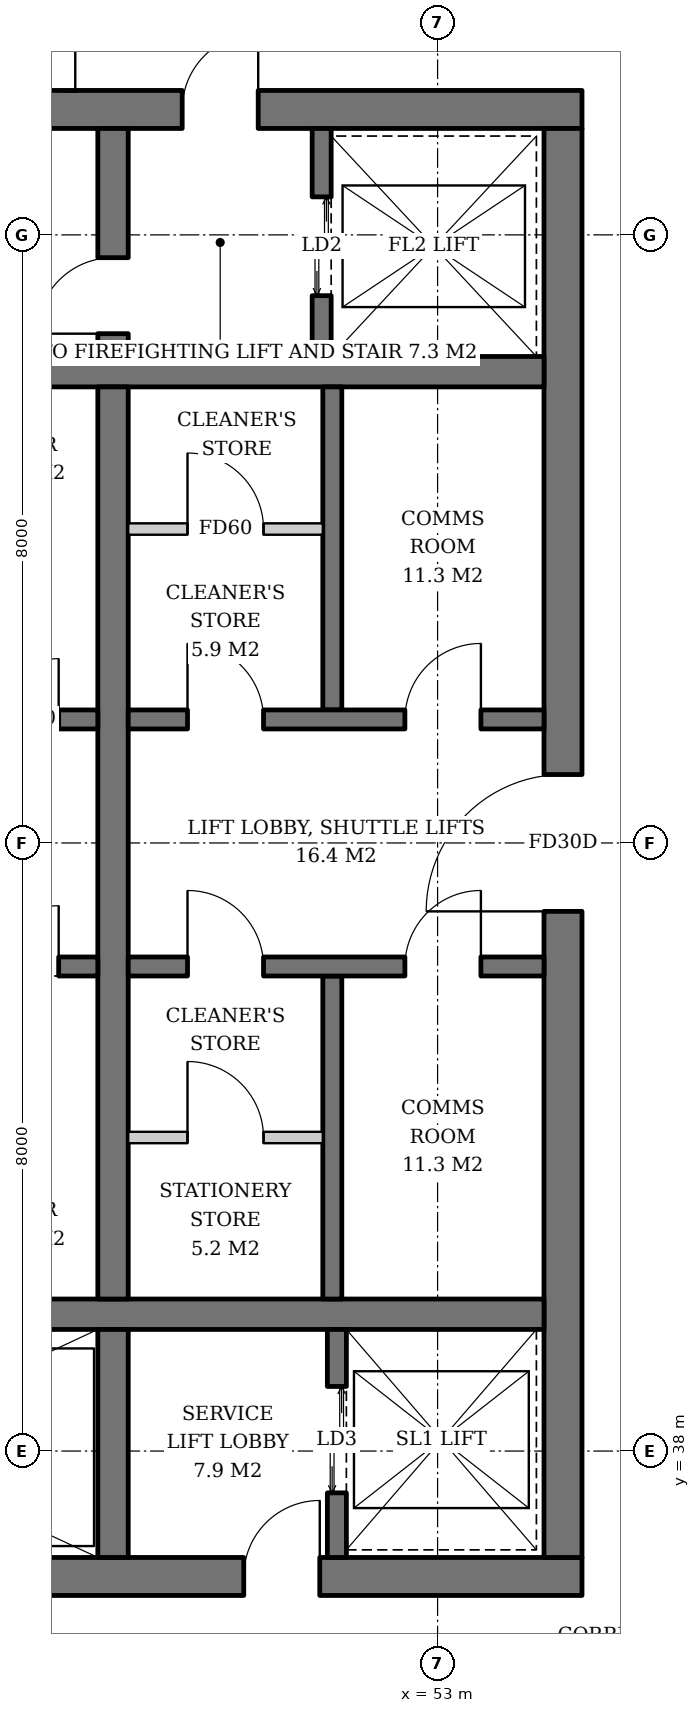
"""IFC4 building model, lengths in metres.
Left out: names, types, materials, properties, quantities, classifications, styles, units other than length and angle.
Written with IfcOpenShell. Run it as: python <this file> out.ifc"""

import sys

from ifc_helpers import new_model, si_unit, direction, frame, frame_2d, origin, place, context, subcontext, project, spatial, rectangle, extrude, element, fill, save


model = new_model("IFC4")
c1 = context("Model", 3, precision=1e-05, world=origin(), true_north=direction((0.0, 1.0)))
c2 = subcontext(c1, "Body", "Model", "MODEL_VIEW")
j1 = project(units=[si_unit("LENGTHUNIT", "METRE"), si_unit("PLANEANGLEUNIT", "RADIAN")], contexts=[c1])
p1 = place(None, origin())
s1 = spatial("IfcSite", under=j1, at=p1, CompositionType="ELEMENT")
p2 = place(p1, origin())
s2 = spatial("IfcBuilding", under=s1, at=p2, CompositionType="ELEMENT")
p3 = place(p2, frame((0.0, 0.0, 264.2)))
s3 = spatial("IfcBuildingStorey", under=s2, at=p3, CompositionType="ELEMENT", Elevation=264.2)
p4 = place(p3, frame((35.1, 36.35, 0.0), z_axis=(0.0, 0.0, 1.0), x_axis=(1.0, 0.0, 0.0)))
e1 = element("IfcWall", 1, at=p4, inside=s3, PredefinedType="SHEAR", context=c2, shape_type="SweptSolid", body=[
    extrude(rectangle(XDim=19.8, YDim=0.5, at=frame_2d((9.9, 0.0))), origin(), (0.0, 0.0, 1.0), 3.8),
])
p5 = place(p4, frame((3.9, 0.0, 0.0)))
e2 = element("IfcOpeningElement", 2, at=p5, cuts=e1, PredefinedType="OPENING", context=c2, shape_type="SweptSolid", body=[
    extrude(rectangle(XDim=1.0, YDim=2.1, at=frame_2d((0.5, 1.05))), frame((0.0, 0.26, 0.0), z_axis=(0.0, -1.0, 0.0), x_axis=(1.0, 0.0, 0.0)), (0.0, 0.0, 1.0), 0.52),
])
p6 = place(p4, frame((15.35, 0.0, 0.0)))
e3 = element("IfcOpeningElement", 3, at=p6, cuts=e1, PredefinedType="OPENING", context=c2, shape_type="SweptSolid", body=[
    extrude(rectangle(XDim=1.0, YDim=2.1, at=frame_2d((0.5, 1.05))), frame((0.0, 0.26, 0.0), z_axis=(0.0, -1.0, 0.0), x_axis=(1.0, 0.0, 0.0)), (0.0, 0.0, 1.0), 0.52),
])
p7 = place(p3, frame((35.1, 55.65, 0.0), z_axis=(0.0, 0.0, 1.0), x_axis=(1.0, 0.0, 0.0)))
e4 = element("IfcWall", 4, at=p7, inside=s3, PredefinedType="SHEAR", context=c2, shape_type="SweptSolid", body=[
    extrude(rectangle(XDim=19.8, YDim=0.5, at=frame_2d((9.9, 0.0))), origin(), (0.0, 0.0, 1.0), 3.8),
])
p8 = place(p7, frame((14.54, 0.0, 0.0)))
e5 = element("IfcOpeningElement", 5, at=p8, cuts=e4, PredefinedType="OPENING", context=c2, shape_type="SweptSolid", body=[
    extrude(rectangle(XDim=1.0, YDim=2.1, at=frame_2d((0.5, 1.05))), frame((0.0, 0.26, 0.0), z_axis=(0.0, -1.0, 0.0), x_axis=(1.0, 0.0, 0.0)), (0.0, 0.0, 1.0), 0.52),
])
p9 = place(p7, frame((0.77, 0.0, 0.0)))
e6 = element("IfcOpeningElement", 6, at=p9, cuts=e4, PredefinedType="OPENING", context=c2, shape_type="SweptSolid", body=[
    extrude(rectangle(XDim=1.0, YDim=2.1, at=frame_2d((0.5, 1.05))), frame((0.0, 0.26, 0.0), z_axis=(0.0, -1.0, 0.0), x_axis=(1.0, 0.0, 0.0)), (0.0, 0.0, 1.0), 0.52),
])
p10 = place(p7, frame((2.28, 0.0, 0.0)))
e7 = element("IfcOpeningElement", 7, at=p10, cuts=e4, PredefinedType="OPENING", context=c2, shape_type="SweptSolid", body=[
    extrude(rectangle(XDim=1.0, YDim=2.1, at=frame_2d((0.5, 1.05))), frame((0.0, 0.26, 0.0), z_axis=(0.0, -1.0, 0.0), x_axis=(1.0, 0.0, 0.0)), (0.0, 0.0, 1.0), 0.52),
])
p11 = place(p7, frame((3.895, 0.0, 0.0)))
e8 = element("IfcOpeningElement", 8, at=p11, cuts=e4, PredefinedType="OPENING", context=c2, shape_type="SweptSolid", body=[
    extrude(rectangle(XDim=1.0, YDim=2.1, at=frame_2d((0.5, 1.05))), frame((0.0, 0.26, 0.0), z_axis=(0.0, -1.0, 0.0), x_axis=(1.0, 0.0, 0.0)), (0.0, 0.0, 1.0), 0.52),
])
p12 = place(p3, frame((54.65, 36.6, 0.0), z_axis=(0.0, 0.0, 1.0), x_axis=(0.0, 1.0, 0.0)))
e9 = element("IfcWall", 9, at=p12, inside=s3, PredefinedType="SHEAR", context=c2, shape_type="SweptSolid", body=[
    extrude(rectangle(XDim=18.8, YDim=0.5, at=frame_2d((9.4, 0.0))), origin(), (0.0, 0.0, 1.0), 3.8),
])
p13 = place(p12, frame((8.5, 0.0, 0.0)))
e10 = element("IfcOpeningElement", 10, at=p13, cuts=e9, PredefinedType="OPENING", context=c2, shape_type="SweptSolid", body=[
    extrude(rectangle(XDim=1.8, YDim=2.4, at=frame_2d((0.9, 1.2))), frame((0.0, 0.26, 0.0), z_axis=(0.0, -1.0, 0.0), x_axis=(1.0, 0.0, 0.0)), (0.0, 0.0, 1.0), 0.52),
])
for number, where, z_axis, x_axis in (
    (11, (35.6, 39.8, 0.0), (0.0, 0.0, 1.0), (1.0, 0.0, 0.0)),
    (12, (35.6, 52.2, 0.0), (0.0, 0.0, 1.0), (1.0, 0.0, 0.0)),
):
    element("IfcWall", number, at=place(p3, frame(where, z_axis=z_axis, x_axis=x_axis)), inside=s3, PredefinedType="SHEAR", context=c2, shape_type="SweptSolid", body=[
        extrude(rectangle(XDim=18.8, YDim=0.4, at=frame_2d((9.4, 0.0))), origin(), (0.0, 0.0, 1.0), 3.8),
    ])
p14 = place(p3, frame((48.73, 36.6, 0.0), z_axis=(0.0, 0.0, 1.0), x_axis=(0.0, 1.0, 0.0)))
e13 = element("IfcWall", 13, at=p14, inside=s3, PredefinedType="SHEAR", context=c2, shape_type="SweptSolid", body=[
    extrude(rectangle(XDim=3.0, YDim=0.4, at=frame_2d((1.5, 0.0))), origin(), (0.0, 0.0, 1.0), 3.8),
])
p15 = place(p3, frame((48.73, 40.0, 0.0), z_axis=(0.0, 0.0, 1.0), x_axis=(0.0, 1.0, 0.0)))
e14 = element("IfcWall", 14, at=p15, inside=s3, PredefinedType="SHEAR", context=c2, shape_type="SweptSolid", body=[
    extrude(rectangle(XDim=12.0, YDim=0.4, at=frame_2d((6.0, 0.0))), origin(), (0.0, 0.0, 1.0), 3.8),
])
p16 = place(p3, frame((48.73, 52.4, 0.0), z_axis=(0.0, 0.0, 1.0), x_axis=(0.0, 1.0, 0.0)))
e15 = element("IfcWall", 15, at=p16, inside=s3, PredefinedType="SHEAR", context=c2, shape_type="SweptSolid", body=[
    extrude(rectangle(XDim=3.0, YDim=0.4, at=frame_2d((1.5, 0.0))), origin(), (0.0, 0.0, 1.0), 3.8),
])
p17 = place(p16, frame((0.3, 0.0, 0.0)))
e16 = element("IfcOpeningElement", 16, at=p17, cuts=e15, PredefinedType="OPENING", context=c2, shape_type="SweptSolid", body=[
    extrude(rectangle(XDim=1.0, YDim=2.1, at=frame_2d((0.5, 1.05))), frame((0.0, 0.21, 0.0), z_axis=(0.0, -1.0, 0.0), x_axis=(1.0, 0.0, 0.0)), (0.0, 0.0, 1.0), 0.42),
])
p18 = place(p3, frame((51.675, 36.6, 0.0), z_axis=(0.0, 0.0, 1.0), x_axis=(0.0, 1.0, 0.0)))
e17 = element("IfcWall", 17, at=p18, inside=s3, PredefinedType="SHEAR", context=c2, shape_type="SweptSolid", body=[
    extrude(rectangle(XDim=3.0, YDim=0.25, at=frame_2d((1.5, 0.0))), origin(), (0.0, 0.0, 1.0), 3.8),
])
p19 = place(p18, frame((0.85, 0.0, 0.0)))
e18 = element("IfcOpeningElement", 18, at=p19, cuts=e17, PredefinedType="OPENING", context=c2, shape_type="SweptSolid", body=[
    extrude(rectangle(XDim=1.4, YDim=2.4, at=frame_2d((0.7, 1.2))), frame((0.0, 0.135, 0.0), z_axis=(0.0, -1.0, 0.0), x_axis=(1.0, 0.0, 0.0)), (0.0, 0.0, 1.0), 0.27),
])
p20 = place(p3, frame((51.475, 52.4, 0.0), z_axis=(0.0, 0.0, 1.0), x_axis=(0.0, 1.0, 0.0)))
e19 = element("IfcWall", 19, at=p20, inside=s3, PredefinedType="SHEAR", context=c2, shape_type="SweptSolid", body=[
    extrude(rectangle(XDim=3.0, YDim=0.25, at=frame_2d((1.5, 0.0))), origin(), (0.0, 0.0, 1.0), 3.8),
])
p21 = place(p20, frame((0.8, 0.0, 0.0)))
e20 = element("IfcOpeningElement", 20, at=p21, cuts=e19, PredefinedType="OPENING", context=c2, shape_type="SweptSolid", body=[
    extrude(rectangle(XDim=1.3, YDim=2.2, at=frame_2d((0.65, 1.1))), frame((0.0, 0.135, 0.0), z_axis=(0.0, -1.0, 0.0), x_axis=(1.0, 0.0, 0.0)), (0.0, 0.0, 1.0), 0.27),
])
p22 = place(p3, frame((35.6, 47.625, 0.0), z_axis=(0.0, 0.0, 1.0), x_axis=(1.0, 0.0, 0.0)))
e21 = element("IfcWall", 21, at=p22, inside=s3, PredefinedType="SHEAR", context=c2, shape_type="SweptSolid", body=[
    extrude(rectangle(XDim=12.93, YDim=0.25, at=frame_2d((6.465, 0.0))), origin(), (0.0, 0.0, 1.0), 3.8),
])
p23 = place(p22, frame((0.75, 0.0, 0.0)))
e22 = element("IfcOpeningElement", 22, at=p23, cuts=e21, PredefinedType="OPENING", context=c2, shape_type="SweptSolid", body=[
    extrude(rectangle(XDim=1.1, YDim=2.2, at=frame_2d((0.55, 1.1))), frame((0.0, 0.135, 0.0), z_axis=(0.0, -1.0, 0.0), x_axis=(1.0, 0.0, 0.0)), (0.0, 0.0, 1.0), 0.27),
])
p24 = place(p22, frame((3.55, 0.0, 0.0)))
e23 = element("IfcOpeningElement", 23, at=p24, cuts=e21, PredefinedType="OPENING", context=c2, shape_type="SweptSolid", body=[
    extrude(rectangle(XDim=1.1, YDim=2.2, at=frame_2d((0.55, 1.1))), frame((0.0, 0.135, 0.0), z_axis=(0.0, -1.0, 0.0), x_axis=(1.0, 0.0, 0.0)), (0.0, 0.0, 1.0), 0.27),
])
p25 = place(p22, frame((6.3, 0.0, 0.0)))
e24 = element("IfcOpeningElement", 24, at=p25, cuts=e21, PredefinedType="OPENING", context=c2, shape_type="SweptSolid", body=[
    extrude(rectangle(XDim=1.1, YDim=2.2, at=frame_2d((0.55, 1.1))), frame((0.0, 0.135, 0.0), z_axis=(0.0, -1.0, 0.0), x_axis=(1.0, 0.0, 0.0)), (0.0, 0.0, 1.0), 0.27),
])
p26 = place(p22, frame((9.1, 0.0, 0.0)))
e25 = element("IfcOpeningElement", 25, at=p26, cuts=e21, PredefinedType="OPENING", context=c2, shape_type="SweptSolid", body=[
    extrude(rectangle(XDim=1.0, YDim=2.1, at=frame_2d((0.5, 1.05))), frame((0.0, 0.135, 0.0), z_axis=(0.0, -1.0, 0.0), x_axis=(1.0, 0.0, 0.0)), (0.0, 0.0, 1.0), 0.27),
])
p27 = place(p22, frame((11.615, 0.0, 0.0)))
e26 = element("IfcOpeningElement", 26, at=p27, cuts=e21, PredefinedType="OPENING", context=c2, shape_type="SweptSolid", body=[
    extrude(rectangle(XDim=0.8, YDim=2.0, at=frame_2d((0.4, 1.0))), frame((0.0, 0.135, 0.0), z_axis=(0.0, -1.0, 0.0), x_axis=(1.0, 0.0, 0.0)), (0.0, 0.0, 1.0), 0.27),
])
p28 = place(p3, frame((35.6, 44.375, 0.0), z_axis=(0.0, 0.0, 1.0), x_axis=(1.0, 0.0, 0.0)))
e27 = element("IfcWall", 27, at=p28, inside=s3, PredefinedType="SHEAR", context=c2, shape_type="SweptSolid", body=[
    extrude(rectangle(XDim=12.93, YDim=0.25, at=frame_2d((6.465, 0.0))), origin(), (0.0, 0.0, 1.0), 3.8),
])
p29 = place(p28, frame((0.75, 0.0, 0.0)))
e28 = element("IfcOpeningElement", 28, at=p29, cuts=e27, PredefinedType="OPENING", context=c2, shape_type="SweptSolid", body=[
    extrude(rectangle(XDim=1.1, YDim=2.2, at=frame_2d((0.55, 1.1))), frame((0.0, 0.135, 0.0), z_axis=(0.0, -1.0, 0.0), x_axis=(1.0, 0.0, 0.0)), (0.0, 0.0, 1.0), 0.27),
])
p30 = place(p28, frame((3.55, 0.0, 0.0)))
e29 = element("IfcOpeningElement", 29, at=p30, cuts=e27, PredefinedType="OPENING", context=c2, shape_type="SweptSolid", body=[
    extrude(rectangle(XDim=1.1, YDim=2.2, at=frame_2d((0.55, 1.1))), frame((0.0, 0.135, 0.0), z_axis=(0.0, -1.0, 0.0), x_axis=(1.0, 0.0, 0.0)), (0.0, 0.0, 1.0), 0.27),
])
p31 = place(p28, frame((6.3, 0.0, 0.0)))
e30 = element("IfcOpeningElement", 30, at=p31, cuts=e27, PredefinedType="OPENING", context=c2, shape_type="SweptSolid", body=[
    extrude(rectangle(XDim=1.1, YDim=2.2, at=frame_2d((0.55, 1.1))), frame((0.0, 0.135, 0.0), z_axis=(0.0, -1.0, 0.0), x_axis=(1.0, 0.0, 0.0)), (0.0, 0.0, 1.0), 0.27),
])
p32 = place(p28, frame((9.1, 0.0, 0.0)))
e31 = element("IfcOpeningElement", 31, at=p32, cuts=e27, PredefinedType="OPENING", context=c2, shape_type="SweptSolid", body=[
    extrude(rectangle(XDim=1.0, YDim=2.1, at=frame_2d((0.5, 1.05))), frame((0.0, 0.135, 0.0), z_axis=(0.0, -1.0, 0.0), x_axis=(1.0, 0.0, 0.0)), (0.0, 0.0, 1.0), 0.27),
])
p33 = place(p28, frame((11.615, 0.0, 0.0)))
e32 = element("IfcOpeningElement", 32, at=p33, cuts=e27, PredefinedType="OPENING", context=c2, shape_type="SweptSolid", body=[
    extrude(rectangle(XDim=0.8, YDim=2.0, at=frame_2d((0.4, 1.0))), frame((0.0, 0.135, 0.0), z_axis=(0.0, -1.0, 0.0), x_axis=(1.0, 0.0, 0.0)), (0.0, 0.0, 1.0), 0.27),
])
p34 = place(p3, frame((51.615, 47.75, 0.0), z_axis=(0.0, 0.0, 1.0), x_axis=(0.0, 1.0, 0.0)))
e33 = element("IfcWall", 33, at=p34, inside=s3, PredefinedType="SHEAR", context=c2, shape_type="SweptSolid", body=[
    extrude(rectangle(XDim=4.25, YDim=0.25, at=frame_2d((2.125, 0.0))), origin(), (0.0, 0.0, 1.0), 3.8),
])
p35 = place(p3, frame((48.93, 47.625, 0.0), z_axis=(0.0, 0.0, 1.0), x_axis=(1.0, 0.0, 0.0)))
e34 = element("IfcWall", 34, at=p35, inside=s3, PredefinedType="SHEAR", context=c2, shape_type="SweptSolid", body=[
    extrude(rectangle(XDim=5.47, YDim=0.25, at=frame_2d((2.735, 0.0))), origin(), (0.0, 0.0, 1.0), 3.8),
])
p36 = place(p35, frame((0.78, 0.0, 0.0)))
e35 = element("IfcOpeningElement", 35, at=p36, cuts=e34, PredefinedType="OPENING", context=c2, shape_type="SweptSolid", body=[
    extrude(rectangle(XDim=1.0, YDim=2.1, at=frame_2d((0.5, 1.05))), frame((0.0, 0.135, 0.0), z_axis=(0.0, -1.0, 0.0), x_axis=(1.0, 0.0, 0.0)), (0.0, 0.0, 1.0), 0.27),
])
p37 = place(p35, frame((3.64, 0.0, 0.0)))
e36 = element("IfcOpeningElement", 36, at=p37, cuts=e34, PredefinedType="OPENING", context=c2, shape_type="SweptSolid", body=[
    extrude(rectangle(XDim=1.0, YDim=2.1, at=frame_2d((0.5, 1.05))), frame((0.0, 0.135, 0.0), z_axis=(0.0, -1.0, 0.0), x_axis=(1.0, 0.0, 0.0)), (0.0, 0.0, 1.0), 0.27),
])
p38 = place(p3, frame((51.615, 44.25, 0.0), z_axis=(0.0, 0.0, 1.0), x_axis=(0.0, -1.0, 0.0)))
e37 = element("IfcWall", 37, at=p38, inside=s3, PredefinedType="SHEAR", context=c2, shape_type="SweptSolid", body=[
    extrude(rectangle(XDim=4.25, YDim=0.25, at=frame_2d((2.125, 0.0))), origin(), (0.0, 0.0, 1.0), 3.8),
])
p39 = place(p3, frame((48.93, 44.375, 0.0), z_axis=(0.0, 0.0, 1.0), x_axis=(1.0, 0.0, 0.0)))
e38 = element("IfcWall", 38, at=p39, inside=s3, PredefinedType="SHEAR", context=c2, shape_type="SweptSolid", body=[
    extrude(rectangle(XDim=5.47, YDim=0.25, at=frame_2d((2.735, 0.0))), origin(), (0.0, 0.0, 1.0), 3.8),
])
p40 = place(p39, frame((0.78, 0.0, 0.0)))
e39 = element("IfcOpeningElement", 39, at=p40, cuts=e38, PredefinedType="OPENING", context=c2, shape_type="SweptSolid", body=[
    extrude(rectangle(XDim=1.0, YDim=2.1, at=frame_2d((0.5, 1.05))), frame((0.0, 0.135, 0.0), z_axis=(0.0, -1.0, 0.0), x_axis=(1.0, 0.0, 0.0)), (0.0, 0.0, 1.0), 0.27),
])
p41 = place(p39, frame((3.64, 0.0, 0.0)))
e40 = element("IfcOpeningElement", 40, at=p41, cuts=e38, PredefinedType="OPENING", context=c2, shape_type="SweptSolid", body=[
    extrude(rectangle(XDim=1.0, YDim=2.1, at=frame_2d((0.5, 1.05))), frame((0.0, 0.135, 0.0), z_axis=(0.0, -1.0, 0.0), x_axis=(1.0, 0.0, 0.0)), (0.0, 0.0, 1.0), 0.27),
])
p42 = place(p3, frame((48.93, 50.13, 0.0), z_axis=(0.0, 0.0, 1.0), x_axis=(1.0, 0.0, 0.0)))
e41 = element("IfcWall", 41, at=p42, inside=s3, PredefinedType="SOLIDWALL", context=c2, shape_type="SweptSolid", body=[
    extrude(rectangle(XDim=2.56, YDim=0.15, at=frame_2d((1.28, 0.0))), origin(), (0.0, 0.0, 1.0), 3.62),
])
p43 = place(p42, frame((0.78, 0.0, 0.0)))
e42 = element("IfcOpeningElement", 42, at=p43, cuts=e41, PredefinedType="OPENING", context=c2, shape_type="SweptSolid", body=[
    extrude(rectangle(XDim=1.0, YDim=2.1, at=frame_2d((0.5, 1.05))), frame((0.0, 0.085, 0.0), z_axis=(0.0, -1.0, 0.0), x_axis=(1.0, 0.0, 0.0)), (0.0, 0.0, 1.0), 0.17),
])
p44 = place(p3, frame((48.93, 42.125, 0.0), z_axis=(0.0, 0.0, 1.0), x_axis=(1.0, 0.0, 0.0)))
e43 = element("IfcWall", 43, at=p44, inside=s3, PredefinedType="SOLIDWALL", context=c2, shape_type="SweptSolid", body=[
    extrude(rectangle(XDim=2.56, YDim=0.15, at=frame_2d((1.28, 0.0))), origin(), (0.0, 0.0, 1.0), 3.62),
])
p45 = place(p44, frame((0.78, 0.0, 0.0)))
e44 = element("IfcOpeningElement", 44, at=p45, cuts=e43, PredefinedType="OPENING", context=c2, shape_type="SweptSolid", body=[
    extrude(rectangle(XDim=1.0, YDim=2.1, at=frame_2d((0.5, 1.05))), frame((0.0, 0.085, 0.0), z_axis=(0.0, -1.0, 0.0), x_axis=(1.0, 0.0, 0.0)), (0.0, 0.0, 1.0), 0.17),
])
p46 = place(p19, origin())
e45 = element("IfcDoor", 45, at=p46, inside=s3, OperationType="DOUBLE_DOOR_SLIDING", PredefinedType="DOOR", context=c2, shape_type="SweptSolid", body=[
    extrude(rectangle(XDim=1.4, YDim=2.4, at=frame_2d((0.7, 1.2))), frame((0.0, 0.025, 0.0), z_axis=(0.0, -1.0, 0.0), x_axis=(1.0, 0.0, 0.0)), (0.0, 0.0, 1.0), 0.05),
])
fill(e18, e45)
p47 = place(p21, origin())
e46 = element("IfcDoor", 46, at=p47, inside=s3, OperationType="DOUBLE_DOOR_SLIDING", PredefinedType="DOOR", context=c2, shape_type="SweptSolid", body=[
    extrude(rectangle(XDim=1.3, YDim=2.2, at=frame_2d((0.65, 1.1))), frame((0.0, 0.025, 0.0), z_axis=(0.0, -1.0, 0.0), x_axis=(1.0, 0.0, 0.0)), (0.0, 0.0, 1.0), 0.05),
])
fill(e20, e46)
p48 = place(p27, origin())
e47 = element("IfcDoor", 47, at=p48, inside=s3, OperationType="SINGLE_SWING_RIGHT", PredefinedType="DOOR", context=c2, shape_type="SweptSolid", body=[
    extrude(rectangle(XDim=0.8, YDim=2.0, at=frame_2d((0.4, 1.0))), frame((0.0, 0.025, 0.0), z_axis=(0.0, -1.0, 0.0), x_axis=(1.0, 0.0, 0.0)), (0.0, 0.0, 1.0), 0.05),
])
fill(e26, e47)
p49 = place(p33, origin())
e48 = element("IfcDoor", 48, at=p49, inside=s3, OperationType="SINGLE_SWING_RIGHT", PredefinedType="DOOR", context=c2, shape_type="SweptSolid", body=[
    extrude(rectangle(XDim=0.8, YDim=2.0, at=frame_2d((0.4, 1.0))), frame((0.0, 0.025, 0.0), z_axis=(0.0, -1.0, 0.0), x_axis=(1.0, 0.0, 0.0)), (0.0, 0.0, 1.0), 0.05),
])
fill(e32, e48)
p50 = place(p36, origin())
e49 = element("IfcDoor", 49, at=p50, inside=s3, OperationType="SINGLE_SWING_LEFT", PredefinedType="DOOR", context=c2, shape_type="SweptSolid", body=[
    extrude(rectangle(XDim=1.0, YDim=2.1, at=frame_2d((0.5, 1.05))), frame((0.0, 0.025, 0.0), z_axis=(0.0, -1.0, 0.0), x_axis=(1.0, 0.0, 0.0)), (0.0, 0.0, 1.0), 0.05),
])
fill(e35, e49)
p51 = place(p37, origin())
e50 = element("IfcDoor", 50, at=p51, inside=s3, OperationType="SINGLE_SWING_RIGHT", PredefinedType="DOOR", context=c2, shape_type="SweptSolid", body=[
    extrude(rectangle(XDim=1.0, YDim=2.1, at=frame_2d((0.5, 1.05))), frame((0.0, 0.025, 0.0), z_axis=(0.0, -1.0, 0.0), x_axis=(1.0, 0.0, 0.0)), (0.0, 0.0, 1.0), 0.05),
])
fill(e36, e50)
p52 = place(p40, origin())
e51 = element("IfcDoor", 51, at=p52, inside=s3, OperationType="SINGLE_SWING_LEFT", PredefinedType="DOOR", context=c2, shape_type="SweptSolid", body=[
    extrude(rectangle(XDim=1.0, YDim=2.1, at=frame_2d((0.5, 1.05))), frame((0.0, 0.025, 0.0), z_axis=(0.0, -1.0, 0.0), x_axis=(1.0, 0.0, 0.0)), (0.0, 0.0, 1.0), 0.05),
])
fill(e39, e51)
p53 = place(p41, origin())
e52 = element("IfcDoor", 52, at=p53, inside=s3, OperationType="SINGLE_SWING_RIGHT", PredefinedType="DOOR", context=c2, shape_type="SweptSolid", body=[
    extrude(rectangle(XDim=1.0, YDim=2.1, at=frame_2d((0.5, 1.05))), frame((0.0, 0.025, 0.0), z_axis=(0.0, -1.0, 0.0), x_axis=(1.0, 0.0, 0.0)), (0.0, 0.0, 1.0), 0.05),
])
fill(e40, e52)
p54 = place(p43, origin())
e53 = element("IfcDoor", 53, at=p54, inside=s3, OperationType="SINGLE_SWING_LEFT", PredefinedType="DOOR", context=c2, shape_type="SweptSolid", body=[
    extrude(rectangle(XDim=1.0, YDim=2.1, at=frame_2d((0.5, 1.05))), frame((0.0, 0.025, 0.0), z_axis=(0.0, -1.0, 0.0), x_axis=(1.0, 0.0, 0.0)), (0.0, 0.0, 1.0), 0.05),
])
fill(e42, e53)
p55 = place(p45, origin())
e54 = element("IfcDoor", 54, at=p55, inside=s3, OperationType="SINGLE_SWING_LEFT", PredefinedType="DOOR", context=c2, shape_type="SweptSolid", body=[
    extrude(rectangle(XDim=1.0, YDim=2.1, at=frame_2d((0.5, 1.05))), frame((0.0, 0.025, 0.0), z_axis=(0.0, -1.0, 0.0), x_axis=(1.0, 0.0, 0.0)), (0.0, 0.0, 1.0), 0.05),
])
fill(e44, e54)
p56 = place(p17, origin())
e55 = element("IfcDoor", 55, at=p56, inside=s3, OperationType="SINGLE_SWING_LEFT", PredefinedType="DOOR", context=c2, shape_type="SweptSolid", body=[
    extrude(rectangle(XDim=1.0, YDim=2.1, at=frame_2d((0.5, 1.05))), frame((0.0, 0.025, 0.0), z_axis=(0.0, -1.0, 0.0), x_axis=(1.0, 0.0, 0.0)), (0.0, 0.0, 1.0), 0.05),
])
fill(e16, e55)
p57 = place(p8, origin())
e56 = element("IfcDoor", 56, at=p57, inside=s3, OperationType="SINGLE_SWING_RIGHT", PredefinedType="DOOR", context=c2, shape_type="SweptSolid", body=[
    extrude(rectangle(XDim=1.0, YDim=2.1, at=frame_2d((0.5, 1.05))), frame((0.0, 0.025, 0.0), z_axis=(0.0, -1.0, 0.0), x_axis=(1.0, 0.0, 0.0)), (0.0, 0.0, 1.0), 0.05),
])
fill(e5, e56)
p58 = place(p13, origin())
e57 = element("IfcDoor", 57, at=p58, inside=s3, OperationType="DOUBLE_DOOR_SINGLE_SWING", PredefinedType="DOOR", context=c2, shape_type="SweptSolid", body=[
    extrude(rectangle(XDim=1.8, YDim=2.4, at=frame_2d((0.9, 1.2))), frame((0.0, 0.025, 0.0), z_axis=(0.0, -1.0, 0.0), x_axis=(1.0, 0.0, 0.0)), (0.0, 0.0, 1.0), 0.05),
])
fill(e10, e57)
p59 = place(p6, origin())
e58 = element("IfcDoor", 58, at=p59, inside=s3, OperationType="SINGLE_SWING_RIGHT", PredefinedType="DOOR", context=c2, shape_type="SweptSolid", body=[
    extrude(rectangle(XDim=1.0, YDim=2.1, at=frame_2d((0.5, 1.05))), frame((0.0, 0.025, 0.0), z_axis=(0.0, -1.0, 0.0), x_axis=(1.0, 0.0, 0.0)), (0.0, 0.0, 1.0), 0.05),
])
fill(e3, e58)
save(model, sys.argv[1])
